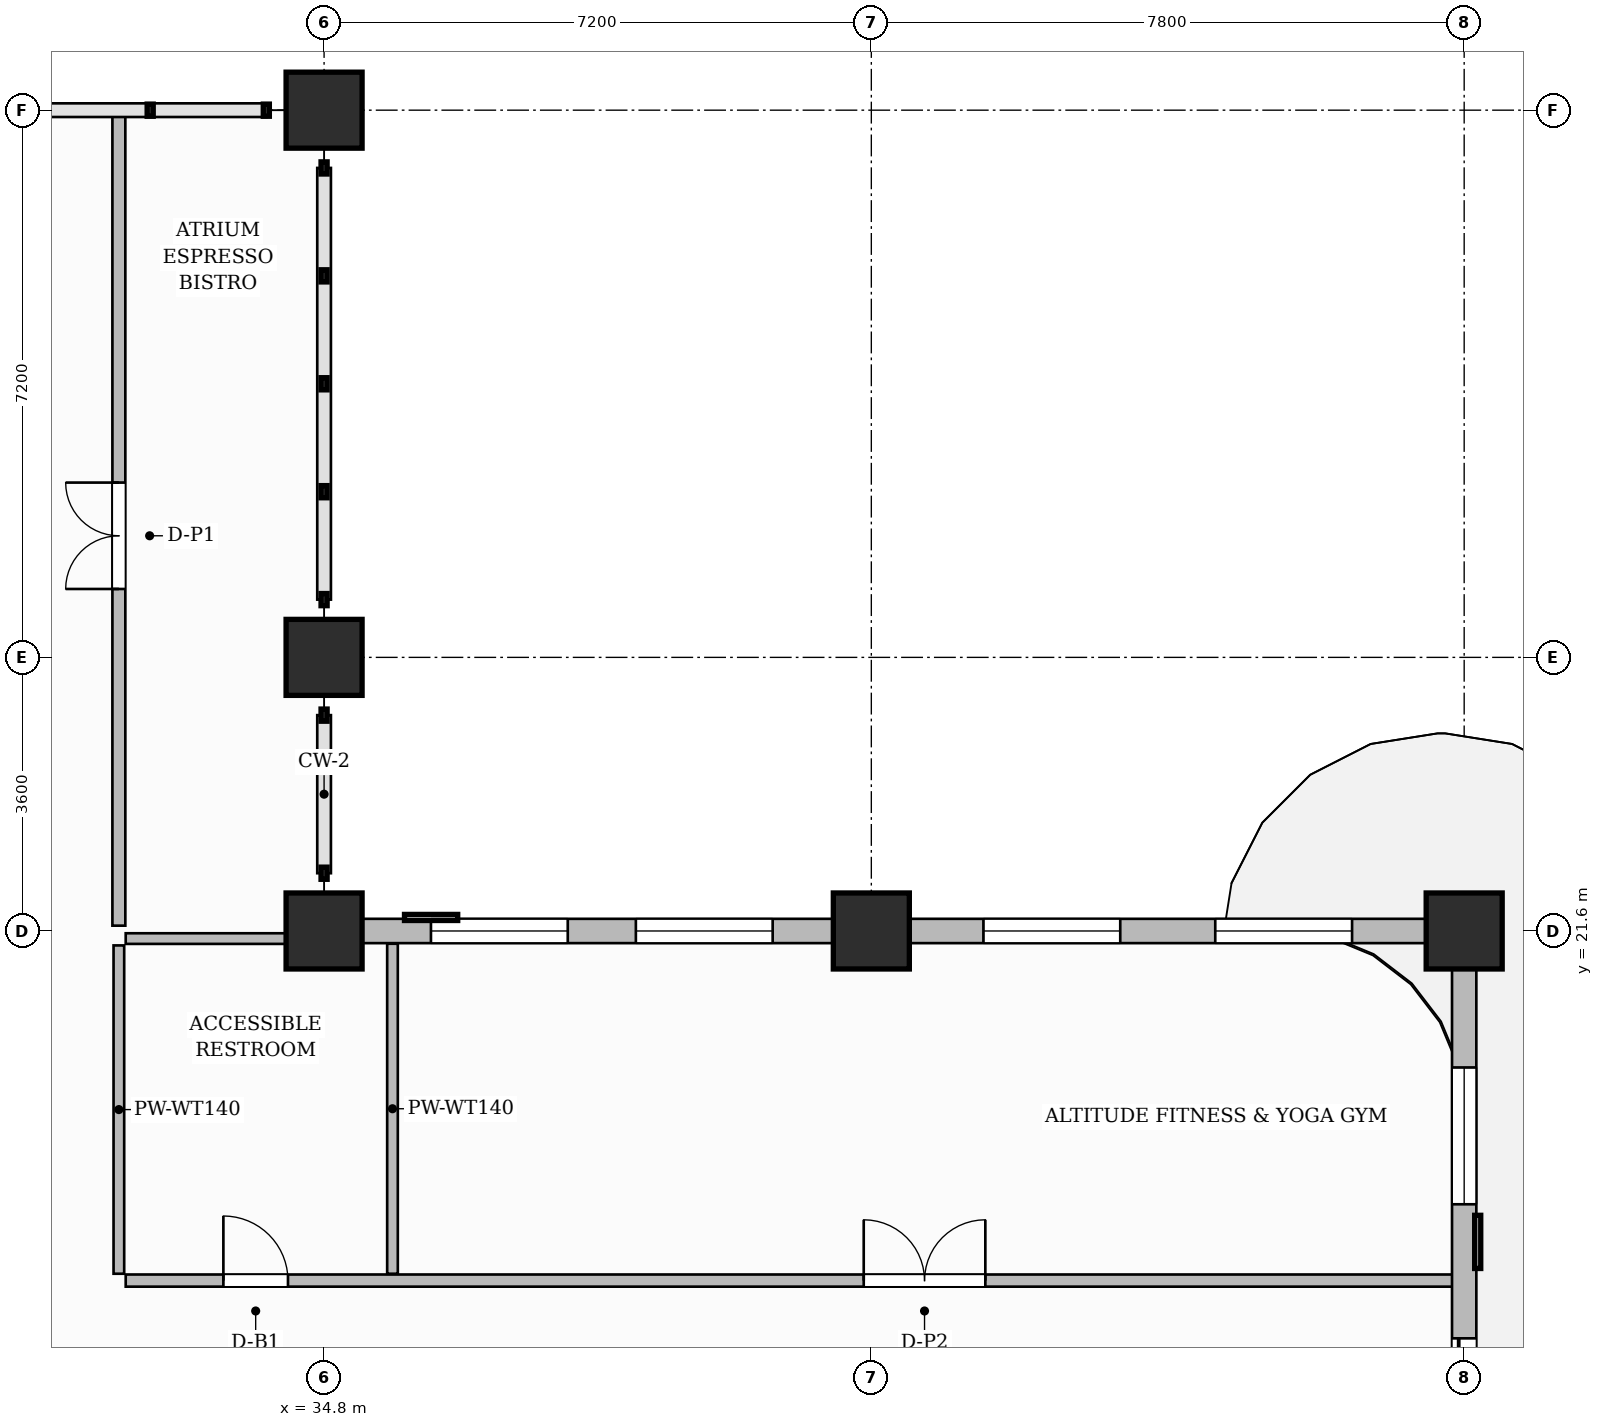
"""IFC4 building model, lengths in metres.
Left out: names, types, materials, properties, quantities, classifications, styles, units other than length and angle.
Written with IfcOpenShell. Run it as: python <this file> out.ifc"""

import sys

from ifc_helpers import new_model, si_unit, direction, frame, frame_2d, origin, origin_2d, place, context, subcontext, project, spatial, rectangle, extrude, source, transform, mapped, element, fill, save


model = new_model("IFC4")
c1 = context("Model", 3, precision=1e-05, world=origin(), true_north=direction((0.0, 1.0)))
c2 = subcontext(c1, "Body", "Model", "MODEL_VIEW")
j1 = project(units=[si_unit("LENGTHUNIT", "METRE"), si_unit("PLANEANGLEUNIT", "RADIAN")], contexts=[c1])
p1 = place(None, origin())
s1 = spatial("IfcSite", under=j1, at=p1, CompositionType="ELEMENT")
p2 = place(p1, origin())
s2 = spatial("IfcBuilding", under=s1, at=p2, CompositionType="ELEMENT")
p3 = place(p2, frame((0.0, 0.0, 130.3)))
s3 = spatial("IfcBuildingStorey", under=s2, at=p3, CompositionType="ELEMENT", Elevation=130.3)
m1 = source(origin(), c2, "Body", "SweptSolid", [
    extrude(rectangle(XDim=1.0, YDim=1.0, at=origin_2d()), origin(), (0.0, 0.0, 1.0), 3.7),
])
for number, where, z_axis, x_axis in (
    (1, (34.8, 21.6, 0.0), (0.0, 0.0, 1.0), (1.0, 0.0, 0.0)),
    (2, (34.8, 25.2, 0.0), (0.0, 0.0, 1.0), (1.0, 0.0, 0.0)),
    (3, (34.8, 32.4, 0.0), (0.0, 0.0, 1.0), (1.0, 0.0, 0.0)),
    (4, (42.0, 21.6, 0.0), (0.0, 0.0, 1.0), (1.0, 0.0, 0.0)),
    (5, (49.8, 21.6, 0.0), (0.0, 0.0, 1.0), (1.0, 0.0, 0.0)),
):
    element("IfcColumn", number, at=place(p3, frame(where, z_axis=z_axis, x_axis=x_axis)), inside=s3, PredefinedType="COLUMN", context=c2, shape_type="MappedRepresentation", body=[
        mapped(m1, transform((0.0, 0.0, 0.0), scale=1.0)),
    ])
p4 = place(p3, frame((32.19, 17.0, 0.0), z_axis=(0.0, 0.0, 1.0), x_axis=(1.0, 0.0, 0.0)))
e6 = element("IfcWall", 6, at=p4, inside=s3, PredefinedType="PARTITIONING", context=c2, shape_type="SweptSolid", body=[
    extrude(rectangle(XDim=17.47, YDim=0.16, at=frame_2d((8.735, 0.0))), origin(), (0.0, 0.0, 1.0), 3.45),
])
p5 = place(p4, frame((1.285, 0.0, 0.0)))
e7 = element("IfcOpeningElement", 7, at=p5, cuts=e6, PredefinedType="OPENING", context=c2, shape_type="SweptSolid", body=[
    extrude(rectangle(XDim=0.85, YDim=2.1, at=frame_2d((0.425, 1.05))), frame((0.0, 0.09, 0.0), z_axis=(0.0, -1.0, 0.0), x_axis=(1.0, 0.0, 0.0)), (0.0, 0.0, 1.0), 0.18),
])
p6 = place(p4, frame((9.71, 0.0, 0.0)))
e8 = element("IfcOpeningElement", 8, at=p6, cuts=e6, PredefinedType="OPENING", context=c2, shape_type="SweptSolid", body=[
    extrude(rectangle(XDim=1.6, YDim=2.4, at=frame_2d((0.8, 1.2))), frame((0.0, 0.09, 0.0), z_axis=(0.0, -1.0, 0.0), x_axis=(1.0, 0.0, 0.0)), (0.0, 0.0, 1.0), 0.18),
])
p7 = place(p3, frame((32.1, 17.09, 0.0), z_axis=(0.0, 0.0, 1.0), x_axis=(0.0, 1.0, 0.0)))
e9 = element("IfcWall", 9, at=p7, inside=s3, PredefinedType="PARTITIONING", context=c2, shape_type="SweptSolid", body=[
    extrude(rectangle(XDim=4.32, YDim=0.14, at=frame_2d((2.16, 0.0))), origin(), (0.0, 0.0, 1.0), 3.45),
])
p8 = place(p3, frame((35.7, 17.09, 0.0), z_axis=(0.0, 0.0, 1.0), x_axis=(0.0, 1.0, 0.0)))
e10 = element("IfcWall", 10, at=p8, inside=s3, PredefinedType="PARTITIONING", context=c2, shape_type="SweptSolid", body=[
    extrude(rectangle(XDim=4.342, YDim=0.14, at=frame_2d((2.171, 0.0))), origin(), (0.0, 0.0, 1.0), 3.45),
])
p9 = place(p3, frame((32.19, 21.5, 0.0), z_axis=(0.0, 0.0, 1.0), x_axis=(1.0, 0.0, 0.0)))
e11 = element("IfcWall", 11, at=p9, inside=s3, PredefinedType="PARTITIONING", context=c2, shape_type="SweptSolid", body=[
    extrude(rectangle(XDim=2.42, YDim=0.14, at=frame_2d((1.21, 0.0))), origin(), (0.0, 0.0, 1.0), 2.935),
])
p10 = place(p3, frame((32.1, 21.67, 0.0), z_axis=(0.0, 0.0, 1.0), x_axis=(0.0, 1.0, 0.0)))
e12 = element("IfcWall", 12, at=p10, inside=s3, PredefinedType="PARTITIONING", context=c2, shape_type="SweptSolid", body=[
    extrude(rectangle(XDim=10.702, YDim=0.17, at=frame_2d((5.351, 0.0))), origin(), (0.0, 0.0, 1.0), 3.45),
])
p11 = place(p10, frame((4.43, 0.0, 0.0)))
e13 = element("IfcOpeningElement", 13, at=p11, cuts=e12, PredefinedType="OPENING", context=c2, shape_type="SweptSolid", body=[
    extrude(rectangle(XDim=1.4, YDim=2.35, at=frame_2d((0.7, 1.175))), frame((0.0, 0.095, 0.0), z_axis=(0.0, -1.0, 0.0), x_axis=(1.0, 0.0, 0.0)), (0.0, 0.0, 1.0), 0.19),
])
p12 = place(p3, frame((49.8, 14.62, 0.0), z_axis=(0.0, 0.0, 1.0), x_axis=(0.0, 1.0, 0.0)))
e14 = element("IfcWall", 14, at=p12, inside=s3, PredefinedType="SOLIDWALL", context=c2, shape_type="SweptSolid", body=[
    extrude(rectangle(XDim=6.93, YDim=0.32, at=frame_2d((3.465, 0.0))), origin(), (0.0, 0.0, 1.0), 2.935),
])
p13 = place(p12, frame((0.42, 0.0, 0.0)))
e15 = element("IfcOpeningElement", 15, at=p13, cuts=e14, PredefinedType="OPENING", context=c2, shape_type="SweptSolid", body=[
    extrude(rectangle(XDim=1.2, YDim=2.2, at=frame_2d((0.6, 1.1))), frame((0.0, 0.17, 0.0), z_axis=(0.0, -1.0, 0.0), x_axis=(1.0, 0.0, 0.0)), (0.0, 0.0, 1.0), 0.34),
])
p14 = place(p12, frame((3.384, 0.0, 0.8)))
e16 = element("IfcOpeningElement", 16, at=p14, cuts=e14, PredefinedType="OPENING", context=c2, shape_type="SweptSolid", body=[
    extrude(rectangle(XDim=1.8, YDim=1.85, at=frame_2d((0.9, 0.925))), frame((0.0, 0.17, 0.0), z_axis=(0.0, -1.0, 0.0), x_axis=(1.0, 0.0, 0.0)), (0.0, 0.0, 1.0), 0.34),
])
p15 = place(p3, frame((34.8, 21.6, 0.0), z_axis=(0.0, 0.0, 1.0), x_axis=(1.0, 0.0, 0.0)))
e17 = element("IfcWall", 17, at=p15, inside=s3, PredefinedType="SOLIDWALL", context=c2, shape_type="SweptSolid", body=[
    extrude(rectangle(XDim=15.0, YDim=0.32, at=frame_2d((7.5, 0.0))), origin(), (0.0, 0.0, 1.0), 2.935),
])
p16 = place(p15, frame((1.406, 0.0, 0.8)))
e18 = element("IfcOpeningElement", 18, at=p16, cuts=e17, PredefinedType="OPENING", context=c2, shape_type="SweptSolid", body=[
    extrude(rectangle(XDim=1.8, YDim=1.85, at=frame_2d((0.9, 0.925))), frame((0.0, 0.17, 0.0), z_axis=(0.0, -1.0, 0.0), x_axis=(1.0, 0.0, 0.0)), (0.0, 0.0, 1.0), 0.34),
])
p17 = place(p15, frame((4.102, 0.0, 0.8)))
e19 = element("IfcOpeningElement", 19, at=p17, cuts=e17, PredefinedType="OPENING", context=c2, shape_type="SweptSolid", body=[
    extrude(rectangle(XDim=1.8, YDim=1.85, at=frame_2d((0.9, 0.925))), frame((0.0, 0.17, 0.0), z_axis=(0.0, -1.0, 0.0), x_axis=(1.0, 0.0, 0.0)), (0.0, 0.0, 1.0), 0.34),
])
p18 = place(p15, frame((8.675, 0.0, 0.8)))
e20 = element("IfcOpeningElement", 20, at=p18, cuts=e17, PredefinedType="OPENING", context=c2, shape_type="SweptSolid", body=[
    extrude(rectangle(XDim=1.8, YDim=1.85, at=frame_2d((0.9, 0.925))), frame((0.0, 0.17, 0.0), z_axis=(0.0, -1.0, 0.0), x_axis=(1.0, 0.0, 0.0)), (0.0, 0.0, 1.0), 0.34),
])
p19 = place(p15, frame((11.725, 0.0, 0.8)))
e21 = element("IfcOpeningElement", 21, at=p19, cuts=e17, PredefinedType="OPENING", context=c2, shape_type="SweptSolid", body=[
    extrude(rectangle(XDim=1.8, YDim=1.85, at=frame_2d((0.9, 0.925))), frame((0.0, 0.17, 0.0), z_axis=(0.0, -1.0, 0.0), x_axis=(1.0, 0.0, 0.0)), (0.0, 0.0, 1.0), 0.34),
])
m2 = source(origin(), c2, "Body", "SweptSolid", [
    extrude(rectangle(XDim=0.85, YDim=2.1, at=frame_2d((0.425, 1.05))), frame((0.0, 0.025, 0.0), z_axis=(0.0, -1.0, 0.0), x_axis=(1.0, 0.0, 0.0)), (0.0, 0.0, 1.0), 0.05),
])
p20 = place(p5, origin())
e22 = element("IfcDoor", 22, at=p20, inside=s3, OperationType="SINGLE_SWING_LEFT", PredefinedType="DOOR", context=c2, shape_type="MappedRepresentation", body=[
    mapped(m2, transform((0.0, 0.0, 0.0), scale=1.0)),
])
fill(e7, e22)
m3 = source(origin(), c2, "Body", "SweptSolid", [
    extrude(rectangle(XDim=1.6, YDim=2.4, at=frame_2d((0.8, 1.2))), frame((0.0, 0.025, 0.0), z_axis=(0.0, -1.0, 0.0), x_axis=(1.0, 0.0, 0.0)), (0.0, 0.0, 1.0), 0.05),
])
p21 = place(p6, origin())
e23 = element("IfcDoor", 23, at=p21, inside=s3, OperationType="DOUBLE_DOOR_SINGLE_SWING", PredefinedType="DOOR", context=c2, shape_type="MappedRepresentation", body=[
    mapped(m3, transform((0.0, 0.0, 0.0), scale=1.0)),
])
fill(e8, e23)
m4 = source(origin(), c2, "Body", "SweptSolid", [
    extrude(rectangle(XDim=1.4, YDim=2.35, at=frame_2d((0.7, 1.175))), frame((0.0, 0.025, 0.0), z_axis=(0.0, -1.0, 0.0), x_axis=(1.0, 0.0, 0.0)), (0.0, 0.0, 1.0), 0.05),
])
p22 = place(p11, origin())
e24 = element("IfcDoor", 24, at=p22, inside=s3, OperationType="DOUBLE_DOOR_SINGLE_SWING", PredefinedType="DOOR", context=c2, shape_type="MappedRepresentation", body=[
    mapped(m4, transform((0.0, 0.0, 0.0), scale=1.0)),
])
fill(e13, e24)
m5 = source(origin(), c2, "Body", "SweptSolid", [
    extrude(rectangle(XDim=1.2, YDim=2.2, at=frame_2d((0.6, 1.1))), frame((0.0, 0.025, 0.0), z_axis=(0.0, -1.0, 0.0), x_axis=(1.0, 0.0, 0.0)), (0.0, 0.0, 1.0), 0.05),
])
p23 = place(p13, origin())
e25 = element("IfcDoor", 25, at=p23, inside=s3, OperationType="SLIDING_TO_LEFT", PredefinedType="DOOR", context=c2, shape_type="MappedRepresentation", body=[
    mapped(m5, transform((0.0, 0.0, 0.0), scale=1.0)),
])
fill(e15, e25)
m6 = source(origin(), c2, "Body", "SweptSolid", [
    extrude(rectangle(XDim=1.8, YDim=1.85, at=frame_2d((0.9, 0.925))), frame((0.0, 0.03, 0.0), z_axis=(0.0, -1.0, 0.0), x_axis=(1.0, 0.0, 0.0)), (0.0, 0.0, 1.0), 0.06),
])
p24 = place(p14, origin())
e26 = element("IfcWindow", 26, at=p24, inside=s3, PartitioningType="DOUBLE_PANEL_VERTICAL", PredefinedType="WINDOW", context=c2, shape_type="MappedRepresentation", body=[
    mapped(m6, transform((0.0, 0.0, 0.0), scale=1.0)),
])
fill(e16, e26)
p25 = place(p16, origin())
e27 = element("IfcWindow", 27, at=p25, inside=s3, PartitioningType="DOUBLE_PANEL_VERTICAL", PredefinedType="WINDOW", context=c2, shape_type="MappedRepresentation", body=[
    mapped(m6, transform((0.0, 0.0, 0.0), scale=1.0)),
])
fill(e18, e27)
p26 = place(p17, origin())
e28 = element("IfcWindow", 28, at=p26, inside=s3, PartitioningType="DOUBLE_PANEL_VERTICAL", PredefinedType="WINDOW", context=c2, shape_type="MappedRepresentation", body=[
    mapped(m6, transform((0.0, 0.0, 0.0), scale=1.0)),
])
fill(e19, e28)
p27 = place(p18, origin())
e29 = element("IfcWindow", 29, at=p27, inside=s3, PartitioningType="DOUBLE_PANEL_VERTICAL", PredefinedType="WINDOW", context=c2, shape_type="MappedRepresentation", body=[
    mapped(m6, transform((0.0, 0.0, 0.0), scale=1.0)),
])
fill(e20, e29)
p28 = place(p19, origin())
e30 = element("IfcWindow", 30, at=p28, inside=s3, PartitioningType="DOUBLE_PANEL_VERTICAL", PredefinedType="WINDOW", context=c2, shape_type="MappedRepresentation", body=[
    mapped(m6, transform((0.0, 0.0, 0.0), scale=1.0)),
])
fill(e21, e30)
save(model, sys.argv[1])
